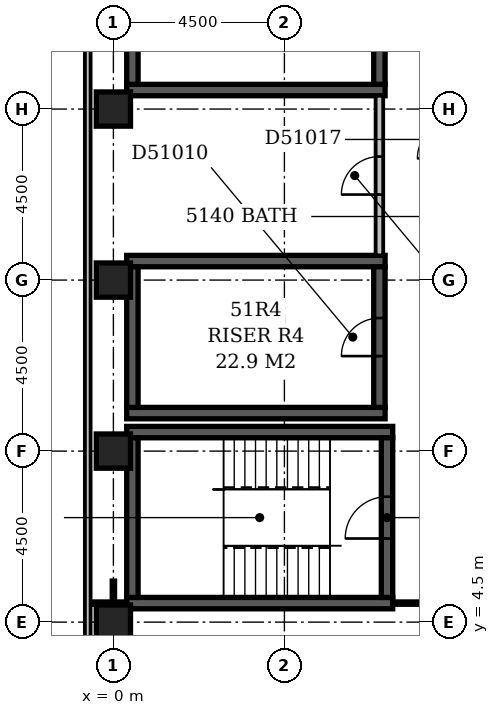
"""IFC4 building model, lengths in metres.
Left out: names, types, materials, properties, quantities, classifications, styles, units other than length and angle.
Written with IfcOpenShell. Run it as: python <this file> out.ifc"""

import sys

from ifc_helpers import new_model, si_unit, direction, frame, frame_2d, origin, origin_2d, place, context, subcontext, project, spatial, rectangle, extrude, element, fill, save


model = new_model("IFC4")
c1 = context("Model", 3, precision=1e-05, world=origin(), true_north=direction((0.0, 1.0)))
c2 = subcontext(c1, "Body", "Model", "MODEL_VIEW")
j1 = project(units=[si_unit("LENGTHUNIT", "METRE"), si_unit("PLANEANGLEUNIT", "RADIAN")], contexts=[c1])
p1 = place(None, origin())
s1 = spatial("IfcSite", under=j1, at=p1, CompositionType="ELEMENT")
p2 = place(p1, origin())
s2 = spatial("IfcBuilding", under=s1, at=p2, CompositionType="ELEMENT")
p3 = place(p2, frame((0.0, 0.0, 200.6)))
s3 = spatial("IfcBuildingStorey", under=s2, at=p3, CompositionType="ELEMENT", Elevation=200.6)
for number, where, z_axis, x_axis in (
    (1, (0.35, 5.0, -0.3), (0.0, 0.0, 1.0), (1.0, 0.0, 0.0)),
    (2, (0.35, 9.5, -0.3), (0.0, 0.0, 1.0), (1.0, 0.0, 0.0)),
):
    element("IfcWall", number, at=place(p3, frame(where, z_axis=z_axis, x_axis=x_axis)), inside=s3, PredefinedType="SHEAR", context=c2, shape_type="SweptSolid", body=[
        extrude(rectangle(XDim=7.0, YDim=0.3, at=frame_2d((3.5, 0.0))), origin(), (0.0, 0.0, 1.0), 3.6),
    ])
for number, where, z_axis, x_axis in (
    (3, (0.35, 10.0, -0.3), (0.0, 0.0, 1.0), (1.0, 0.0, 0.0)),
    (4, (0.35, 14.0, -0.3), (0.0, 0.0, 1.0), (1.0, 0.0, 0.0)),
    (5, (0.35, 18.5, -0.3), (0.0, 0.0, 1.0), (1.0, 0.0, 0.0)),
):
    element("IfcWall", number, at=place(p3, frame(where, z_axis=z_axis, x_axis=x_axis)), inside=s3, PredefinedType="SHEAR", context=c2, shape_type="SweptSolid", body=[
        extrude(rectangle(XDim=6.8, YDim=0.3, at=frame_2d((3.4, 0.0))), origin(), (0.0, 0.0, 1.0), 3.6),
    ])
p4 = place(p3, frame((0.5, 5.15, -0.3), z_axis=(0.0, 0.0, 1.0), x_axis=(0.0, 1.0, 0.0)))
e6 = element("IfcWall", 6, at=p4, inside=s3, PredefinedType="SHEAR", context=c2, shape_type="SweptSolid", body=[
    extrude(rectangle(XDim=4.2, YDim=0.3, at=frame_2d((2.1, 0.0))), origin(), (0.0, 0.0, 1.0), 3.6),
])
for number, where, z_axis, x_axis in (
    (7, (0.5, 10.15, -0.3), (0.0, 0.0, 1.0), (0.0, 1.0, 0.0)),
    (8, (0.5, 18.65, -0.3), (0.0, 0.0, 1.0), (0.0, 1.0, 0.0)),
):
    element("IfcWall", number, at=place(p3, frame(where, z_axis=z_axis, x_axis=x_axis)), inside=s3, PredefinedType="SHEAR", context=c2, shape_type="SweptSolid", body=[
        extrude(rectangle(XDim=3.7, YDim=0.3, at=frame_2d((1.85, 0.0))), origin(), (0.0, 0.0, 1.0), 3.6),
    ])
p5 = place(p3, frame((7.0, 10.15, -0.3), z_axis=(0.0, 0.0, 1.0), x_axis=(0.0, 1.0, 0.0)))
e9 = element("IfcWall", 9, at=p5, inside=s3, PredefinedType="SHEAR", context=c2, shape_type="SweptSolid", body=[
    extrude(rectangle(XDim=3.7, YDim=0.3, at=frame_2d((1.85, 0.0))), origin(), (0.0, 0.0, 1.0), 3.6),
])
p6 = place(p5, frame((1.35, 0.0, 0.3)))
e10 = element("IfcOpeningElement", 10, at=p6, cuts=e9, PredefinedType="OPENING", context=c2, shape_type="SweptSolid", body=[
    extrude(rectangle(XDim=1.0, YDim=2.1, at=frame_2d((0.5, 1.05))), frame((0.0, 0.162, 0.0), z_axis=(0.0, -1.0, 0.0), x_axis=(1.0, 0.0, 0.0)), (0.0, 0.0, 1.0), 0.324),
])
p7 = place(p3, frame((7.0, 18.65, -0.3), z_axis=(0.0, 0.0, 1.0), x_axis=(0.0, 1.0, 0.0)))
e11 = element("IfcWall", 11, at=p7, inside=s3, PredefinedType="SHEAR", context=c2, shape_type="SweptSolid", body=[
    extrude(rectangle(XDim=3.7, YDim=0.3, at=frame_2d((1.85, 0.0))), origin(), (0.0, 0.0, 1.0), 3.6),
])
p8 = place(p7, frame((1.35, 0.0, 0.3)))
e12 = element("IfcOpeningElement", 12, at=p8, cuts=e11, PredefinedType="OPENING", context=c2, shape_type="SweptSolid", body=[
    extrude(rectangle(XDim=1.0, YDim=2.1, at=frame_2d((0.5, 1.05))), frame((0.0, 0.162, 0.0), z_axis=(0.0, -1.0, 0.0), x_axis=(1.0, 0.0, 0.0)), (0.0, 0.0, 1.0), 0.324),
])
p9 = place(p3, frame((7.2, 5.15, -0.3), z_axis=(0.0, 0.0, 1.0), x_axis=(0.0, 1.0, 0.0)))
e13 = element("IfcWall", 13, at=p9, inside=s3, PredefinedType="SHEAR", context=c2, shape_type="SweptSolid", body=[
    extrude(rectangle(XDim=4.2, YDim=0.3, at=frame_2d((2.1, 0.0))), origin(), (0.0, 0.0, 1.0), 3.6),
])
p10 = place(p9, frame((1.55, 0.0, 0.3)))
e14 = element("IfcOpeningElement", 14, at=p10, cuts=e13, PredefinedType="OPENING", context=c2, shape_type="SweptSolid", body=[
    extrude(rectangle(XDim=1.1, YDim=2.1, at=frame_2d((0.55, 1.05))), frame((0.0, 0.162, 0.0), z_axis=(0.0, -1.0, 0.0), x_axis=(1.0, 0.0, 0.0)), (0.0, 0.0, 1.0), 0.324),
])
for number, where, z_axis, x_axis in (
    (15, (0.0, 4.5, -0.3), (0.0, 0.0, 1.0), (1.0, 0.0, 0.0)),
    (16, (0.0, 9.0, -0.3), (0.0, 0.0, 1.0), (1.0, 0.0, 0.0)),
    (17, (0.0, 13.5, -0.3), (0.0, 0.0, 1.0), (1.0, 0.0, 0.0)),
    (18, (0.0, 18.0, -0.3), (0.0, 0.0, 1.0), (1.0, 0.0, 0.0)),
):
    element("IfcColumn", number, at=place(p3, frame(where, z_axis=z_axis, x_axis=x_axis)), inside=s3, PredefinedType="COLUMN", context=c2, shape_type="SweptSolid", body=[
        extrude(rectangle(XDim=0.9, YDim=0.9, at=origin_2d()), origin(), (0.0, 0.0, 1.0), 3.6),
    ])
p11 = place(p3, frame((-0.675, 59.1, 0.0), z_axis=(0.0, 0.0, 1.0), x_axis=(0.0, -1.0, 0.0)))
e19 = element("IfcWall", 19, at=p11, inside=s3, PredefinedType="STANDARD", context=c2, shape_type="SweptSolid", body=[
    extrude(rectangle(XDim=55.35, YDim=0.15, at=frame_2d((27.675, 0.0))), origin(), (0.0, 0.0, 1.0), 2.7),
])
p12 = place(p3, frame((0.0, 4.95, 0.0), z_axis=(0.0, 0.0, 1.0), x_axis=(0.0, 1.0, 0.0)))
e20 = element("IfcWall", 20, at=p12, inside=s3, PredefinedType="PARTITIONING", context=c2, shape_type="SweptSolid", body=[
    extrude(rectangle(XDim=0.65, YDim=0.1, at=frame_2d((0.325, 0.0))), origin(), (0.0, 0.0, 1.0), 2.7),
])
p13 = place(p3, frame((-0.6, 5.0, 0.0), z_axis=(0.0, 0.0, 1.0), x_axis=(1.0, 0.0, 0.0)))
e21 = element("IfcWall", 21, at=p13, inside=s3, PredefinedType="PARTITIONING", context=c2, shape_type="SweptSolid", body=[
    extrude(rectangle(XDim=0.951, YDim=0.1, at=frame_2d((0.476, 0.0))), origin(), (0.0, 0.0, 1.0), 3.3),
])
p14 = place(p3, frame((7.349, 5.0, 0.0), z_axis=(0.0, 0.0, 1.0), x_axis=(1.0, 0.0, 0.0)))
e22 = element("IfcWall", 22, at=p14, inside=s3, PredefinedType="PARTITIONING", context=c2, shape_type="SweptSolid", body=[
    extrude(rectangle(XDim=1.551, YDim=0.1, at=frame_2d((0.775, 0.0))), origin(), (0.0, 0.0, 1.0), 3.3),
])
p15 = place(p3, frame((7.0, 14.15, 0.0), z_axis=(0.0, 0.0, 1.0), x_axis=(0.0, 1.0, 0.0)))
e23 = element("IfcWall", 23, at=p15, inside=s3, PredefinedType="PARTITIONING", context=c2, shape_type="SweptSolid", body=[
    extrude(rectangle(XDim=4.2, YDim=0.2, at=frame_2d((2.1, 0.0))), origin(), (0.0, 0.0, 1.0), 3.3),
])
p16 = place(p15, frame((1.6, 0.0, 0.0)))
e24 = element("IfcOpeningElement", 24, at=p16, cuts=e23, PredefinedType="OPENING", context=c2, shape_type="SweptSolid", body=[
    extrude(rectangle(XDim=1.0, YDim=2.1, at=frame_2d((0.5, 1.05))), frame((0.0, 0.112, 0.0), z_axis=(0.0, -1.0, 0.0), x_axis=(1.0, 0.0, 0.0)), (0.0, 0.0, 1.0), 0.224),
])
p17 = place(p6, origin())
e25 = element("IfcDoor", 25, at=p17, inside=s3, OperationType="SINGLE_SWING_LEFT", PredefinedType="DOOR", context=c2, shape_type="SweptSolid", body=[
    extrude(rectangle(XDim=1.0, YDim=2.1, at=frame_2d((0.5, 1.05))), frame((0.0, 0.025, 0.0), z_axis=(0.0, -1.0, 0.0), x_axis=(1.0, 0.0, 0.0)), (0.0, 0.0, 1.0), 0.05),
])
fill(e10, e25)
p18 = place(p10, origin())
e26 = element("IfcDoor", 26, at=p18, inside=s3, OperationType="SINGLE_SWING_LEFT", PredefinedType="DOOR", context=c2, shape_type="SweptSolid", body=[
    extrude(rectangle(XDim=1.1, YDim=2.1, at=frame_2d((0.55, 1.05))), frame((0.0, 0.025, 0.0), z_axis=(0.0, -1.0, 0.0), x_axis=(1.0, 0.0, 0.0)), (0.0, 0.0, 1.0), 0.05),
])
fill(e14, e26)
p19 = place(p16, origin())
e27 = element("IfcDoor", 27, at=p19, inside=s3, OperationType="SINGLE_SWING_LEFT", PredefinedType="DOOR", context=c2, shape_type="SweptSolid", body=[
    extrude(rectangle(XDim=1.0, YDim=2.1, at=frame_2d((0.5, 1.05))), frame((0.0, 0.025, 0.0), z_axis=(0.0, -1.0, 0.0), x_axis=(1.0, 0.0, 0.0)), (0.0, 0.0, 1.0), 0.05),
])
fill(e24, e27)
save(model, sys.argv[1])
